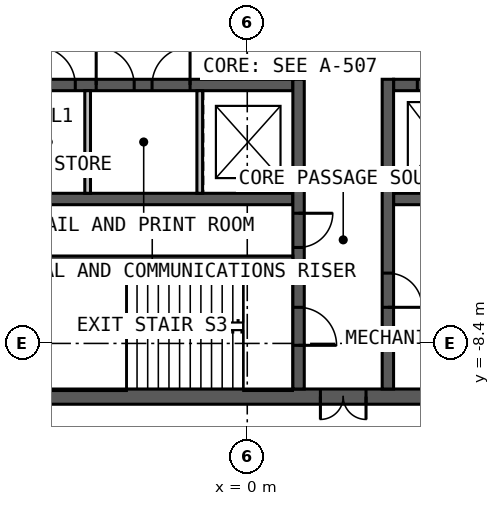
"""IFC4 building model, lengths in metres.
Left out: names, types, materials, properties, quantities, classifications, styles, units other than length and angle.
Written with IfcOpenShell. Run it as: python <this file> out.ifc"""

import sys

from ifc_helpers import new_model, si_unit, direction, frame, frame_2d, origin, place, context, subcontext, project, spatial, rectangle, extrude, element, fill, save


model = new_model("IFC4")
c1 = context("Model", 3, precision=1e-05, world=origin(), true_north=direction((0.0, 1.0)))
c2 = subcontext(c1, "Body", "Model", "MODEL_VIEW")
j1 = project(units=[si_unit("LENGTHUNIT", "METRE"), si_unit("PLANEANGLEUNIT", "RADIAN")], contexts=[c1])
p1 = place(None, origin())
s1 = spatial("IfcSite", under=j1, at=p1, CompositionType="ELEMENT")
p2 = place(p1, origin())
s2 = spatial("IfcBuilding", under=s1, at=p2, CompositionType="ELEMENT")
p3 = place(p2, frame((0.0, 0.0, 232.0)))
s3 = spatial("IfcBuildingStorey", under=s2, at=p3, CompositionType="ELEMENT", Elevation=232.0)
p4 = place(p3, frame((10.0, -9.8, 0.0), z_axis=(0.0, 0.0, 1.0), x_axis=(-1.0, 0.0, 0.0)))
e1 = element("IfcWall", 1, at=p4, inside=s3, PredefinedType="SOLIDWALL", context=c2, shape_type="SweptSolid", body=[
    extrude(rectangle(XDim=20.0, YDim=0.4, at=frame_2d((10.0, 0.0))), origin(), (0.0, 0.0, 1.0), 4.0),
])
p5 = place(p4, frame((6.875, 0.0, 0.0)))
e2 = element("IfcOpeningElement", 2, at=p5, cuts=e1, PredefinedType="OPENING", context=c2, shape_type="SweptSolid", body=[
    extrude(rectangle(XDim=1.2, YDim=2.2, at=frame_2d((0.6, 1.1))), frame((0.0, 0.21, 0.0), z_axis=(0.0, -1.0, 0.0), x_axis=(1.0, 0.0, 0.0)), (0.0, 0.0, 1.0), 0.42),
])
p6 = place(p3, frame((-6.2, -1.6, 0.0), z_axis=(0.0, 0.0, 1.0), x_axis=(1.0, 0.0, 0.0)))
e3 = element("IfcWall", 3, at=p6, inside=s3, PredefinedType="SOLIDWALL", context=c2, shape_type="SweptSolid", body=[
    extrude(rectangle(XDim=7.4, YDim=0.3, at=frame_2d((3.7, 0.0))), origin(), (0.0, 0.0, 1.0), 4.0),
])
p7 = place(p6, frame((0.675, 0.0, 0.0)))
e4 = element("IfcOpeningElement", 4, at=p7, cuts=e3, PredefinedType="OPENING", context=c2, shape_type="SweptSolid", body=[
    extrude(rectangle(XDim=1.0, YDim=2.2, at=frame_2d((0.5, 1.1))), frame((0.0, 0.16, 0.0), z_axis=(0.0, -1.0, 0.0), x_axis=(1.0, 0.0, 0.0)), (0.0, 0.0, 1.0), 0.32),
])
p8 = place(p6, frame((2.225, 0.0, 0.0)))
e5 = element("IfcOpeningElement", 5, at=p8, cuts=e3, PredefinedType="OPENING", context=c2, shape_type="SweptSolid", body=[
    extrude(rectangle(XDim=1.0, YDim=2.2, at=frame_2d((0.5, 1.1))), frame((0.0, 0.16, 0.0), z_axis=(0.0, -1.0, 0.0), x_axis=(1.0, 0.0, 0.0)), (0.0, 0.0, 1.0), 0.32),
])
p9 = place(p6, frame((3.695, 0.0, 0.0)))
e6 = element("IfcOpeningElement", 6, at=p9, cuts=e3, PredefinedType="OPENING", context=c2, shape_type="SweptSolid", body=[
    extrude(rectangle(XDim=1.0, YDim=2.2, at=frame_2d((0.5, 1.1))), frame((0.0, 0.16, 0.0), z_axis=(0.0, -1.0, 0.0), x_axis=(1.0, 0.0, 0.0)), (0.0, 0.0, 1.0), 0.32),
])
p10 = place(p3, frame((3.85, -1.6, 0.0), z_axis=(0.0, 0.0, 1.0), x_axis=(1.0, 0.0, 0.0)))
e7 = element("IfcWall", 7, at=p10, inside=s3, PredefinedType="SOLIDWALL", context=c2, shape_type="SweptSolid", body=[
    extrude(rectangle(XDim=2.35, YDim=0.3, at=frame_2d((1.175, 0.0))), origin(), (0.0, 0.0, 1.0), 4.0),
])
p11 = place(p10, frame((0.625, 0.0, 0.0)))
e8 = element("IfcOpeningElement", 8, at=p11, cuts=e7, PredefinedType="OPENING", context=c2, shape_type="SweptSolid", body=[
    extrude(rectangle(XDim=1.1, YDim=2.2, at=frame_2d((0.55, 1.1))), frame((0.0, 0.16, 0.0), z_axis=(0.0, -1.0, 0.0), x_axis=(1.0, 0.0, 0.0)), (0.0, 0.0, 1.0), 0.32),
])
p12 = place(p3, frame((-6.2, -4.6, 0.0), z_axis=(0.0, 0.0, 1.0), x_axis=(1.0, 0.0, 0.0)))
e9 = element("IfcWall", 9, at=p12, inside=s3, PredefinedType="SOLIDWALL", context=c2, shape_type="SweptSolid", body=[
    extrude(rectangle(XDim=7.4, YDim=0.3, at=frame_2d((3.7, 0.0))), origin(), (0.0, 0.0, 1.0), 4.0),
])
p13 = place(p3, frame((3.85, -4.6, 0.0), z_axis=(0.0, 0.0, 1.0), x_axis=(1.0, 0.0, 0.0)))
e10 = element("IfcWall", 10, at=p13, inside=s3, PredefinedType="SOLIDWALL", context=c2, shape_type="SweptSolid", body=[
    extrude(rectangle(XDim=2.35, YDim=0.3, at=frame_2d((1.175, 0.0))), origin(), (0.0, 0.0, 1.0), 4.0),
])
p14 = place(p3, frame((1.35, -1.45, 0.0), z_axis=(0.0, 0.0, 1.0), x_axis=(0.0, -1.0, 0.0)))
e11 = element("IfcWall", 11, at=p14, inside=s3, PredefinedType="SOLIDWALL", context=c2, shape_type="SweptSolid", body=[
    extrude(rectangle(XDim=8.15, YDim=0.3, at=frame_2d((4.075, 0.0))), origin(), (0.0, 0.0, 1.0), 4.0),
])
p15 = place(p14, frame((6.0, 0.0, 0.0)))
e12 = element("IfcOpeningElement", 12, at=p15, cuts=e11, PredefinedType="OPENING", context=c2, shape_type="SweptSolid", body=[
    extrude(rectangle(XDim=1.0, YDim=2.2, at=frame_2d((0.5, 1.1))), frame((0.0, 0.16, 0.0), z_axis=(0.0, -1.0, 0.0), x_axis=(1.0, 0.0, 0.0)), (0.0, 0.0, 1.0), 0.32),
])
p16 = place(p14, frame((3.525, 0.0, 0.0)))
e13 = element("IfcOpeningElement", 13, at=p16, cuts=e11, PredefinedType="OPENING", context=c2, shape_type="SweptSolid", body=[
    extrude(rectangle(XDim=0.9, YDim=2.2, at=frame_2d((0.45, 1.1))), frame((0.0, 0.16, 0.0), z_axis=(0.0, -1.0, 0.0), x_axis=(1.0, 0.0, 0.0)), (0.0, 0.0, 1.0), 0.32),
])
p17 = place(p3, frame((3.7, -1.45, 0.0), z_axis=(0.0, 0.0, 1.0), x_axis=(0.0, -1.0, 0.0)))
e14 = element("IfcWall", 14, at=p17, inside=s3, PredefinedType="SOLIDWALL", context=c2, shape_type="SweptSolid", body=[
    extrude(rectangle(XDim=8.15, YDim=0.3, at=frame_2d((4.075, 0.0))), origin(), (0.0, 0.0, 1.0), 4.0),
])
p18 = place(p17, frame((5.1, 0.0, 0.0)))
e15 = element("IfcOpeningElement", 15, at=p18, cuts=e14, PredefinedType="OPENING", context=c2, shape_type="SweptSolid", body=[
    extrude(rectangle(XDim=0.9, YDim=2.2, at=frame_2d((0.45, 1.1))), frame((0.0, 0.16, 0.0), z_axis=(0.0, -1.0, 0.0), x_axis=(1.0, 0.0, 0.0)), (0.0, 0.0, 1.0), 0.32),
])
p19 = place(p3, frame((-6.2, -6.2, 0.0), z_axis=(0.0, 0.0, 1.0), x_axis=(1.0, 0.0, 0.0)))
e16 = element("IfcWall", 16, at=p19, inside=s3, PredefinedType="SOLIDWALL", context=c2, shape_type="SweptSolid", body=[
    extrude(rectangle(XDim=7.4, YDim=0.2, at=frame_2d((3.7, 0.0))), origin(), (0.0, 0.0, 1.0), 4.0),
])
for number, where, z_axis, x_axis in (
    (17, (-4.2, -1.75, 0.0), (0.0, 0.0, 1.0), (0.0, -1.0, 0.0)),
    (18, (-1.25, -1.75, 0.0), (0.0, 0.0, 1.0), (0.0, -1.0, 0.0)),
):
    element("IfcWall", number, at=place(p3, frame(where, z_axis=z_axis, x_axis=x_axis)), inside=s3, PredefinedType="PARTITIONING", context=c2, shape_type="SweptSolid", body=[
        extrude(rectangle(XDim=2.7, YDim=0.15, at=frame_2d((1.35, 0.0))), origin(), (0.0, 0.0, 1.0), 3.75),
    ])
p20 = place(p5, origin())
e19 = element("IfcDoor", 19, at=p20, inside=s3, OperationType="DOUBLE_DOOR_SINGLE_SWING", PredefinedType="DOOR", context=c2, shape_type="SweptSolid", body=[
    extrude(rectangle(XDim=1.2, YDim=2.2, at=frame_2d((0.6, 1.1))), frame((0.0, 0.025, 0.0), z_axis=(0.0, -1.0, 0.0), x_axis=(1.0, 0.0, 0.0)), (0.0, 0.0, 1.0), 0.05),
])
fill(e2, e19)
p21 = place(p15, origin())
e20 = element("IfcDoor", 20, at=p21, inside=s3, OperationType="SINGLE_SWING_RIGHT", PredefinedType="DOOR", context=c2, shape_type="SweptSolid", body=[
    extrude(rectangle(XDim=1.0, YDim=2.2, at=frame_2d((0.5, 1.1))), frame((0.0, 0.025, 0.0), z_axis=(0.0, -1.0, 0.0), x_axis=(1.0, 0.0, 0.0)), (0.0, 0.0, 1.0), 0.05),
])
fill(e12, e20)
p22 = place(p16, origin())
e21 = element("IfcDoor", 21, at=p22, inside=s3, OperationType="SINGLE_SWING_LEFT", PredefinedType="DOOR", context=c2, shape_type="SweptSolid", body=[
    extrude(rectangle(XDim=0.9, YDim=2.2, at=frame_2d((0.45, 1.1))), frame((0.0, 0.025, 0.0), z_axis=(0.0, -1.0, 0.0), x_axis=(1.0, 0.0, 0.0)), (0.0, 0.0, 1.0), 0.05),
])
fill(e13, e21)
p23 = place(p18, origin())
e22 = element("IfcDoor", 22, at=p23, inside=s3, OperationType="SINGLE_SWING_RIGHT", PredefinedType="DOOR", context=c2, shape_type="SweptSolid", body=[
    extrude(rectangle(XDim=0.9, YDim=2.2, at=frame_2d((0.45, 1.1))), frame((0.0, 0.025, 0.0), z_axis=(0.0, -1.0, 0.0), x_axis=(1.0, 0.0, 0.0)), (0.0, 0.0, 1.0), 0.05),
])
fill(e15, e22)
p24 = place(p7, origin())
e23 = element("IfcDoor", 23, at=p24, inside=s3, OperationType="SINGLE_SWING_LEFT", PredefinedType="DOOR", context=c2, shape_type="SweptSolid", body=[
    extrude(rectangle(XDim=1.0, YDim=2.2, at=frame_2d((0.5, 1.1))), frame((0.0, 0.025, 0.0), z_axis=(0.0, -1.0, 0.0), x_axis=(1.0, 0.0, 0.0)), (0.0, 0.0, 1.0), 0.05),
])
fill(e4, e23)
p25 = place(p8, origin())
e24 = element("IfcDoor", 24, at=p25, inside=s3, OperationType="SINGLE_SWING_LEFT", PredefinedType="DOOR", context=c2, shape_type="SweptSolid", body=[
    extrude(rectangle(XDim=1.0, YDim=2.2, at=frame_2d((0.5, 1.1))), frame((0.0, 0.025, 0.0), z_axis=(0.0, -1.0, 0.0), x_axis=(1.0, 0.0, 0.0)), (0.0, 0.0, 1.0), 0.05),
])
fill(e5, e24)
p26 = place(p9, origin())
e25 = element("IfcDoor", 25, at=p26, inside=s3, OperationType="SINGLE_SWING_RIGHT", PredefinedType="DOOR", context=c2, shape_type="SweptSolid", body=[
    extrude(rectangle(XDim=1.0, YDim=2.2, at=frame_2d((0.5, 1.1))), frame((0.0, 0.025, 0.0), z_axis=(0.0, -1.0, 0.0), x_axis=(1.0, 0.0, 0.0)), (0.0, 0.0, 1.0), 0.05),
])
fill(e6, e25)
p27 = place(p11, origin())
e26 = element("IfcDoor", 26, at=p27, inside=s3, OperationType="SLIDING_TO_LEFT", PredefinedType="DOOR", context=c2, shape_type="SweptSolid", body=[
    extrude(rectangle(XDim=1.1, YDim=2.2, at=frame_2d((0.55, 1.1))), frame((0.0, 0.025, 0.0), z_axis=(0.0, -1.0, 0.0), x_axis=(1.0, 0.0, 0.0)), (0.0, 0.0, 1.0), 0.05),
])
fill(e8, e26)
save(model, sys.argv[1])
